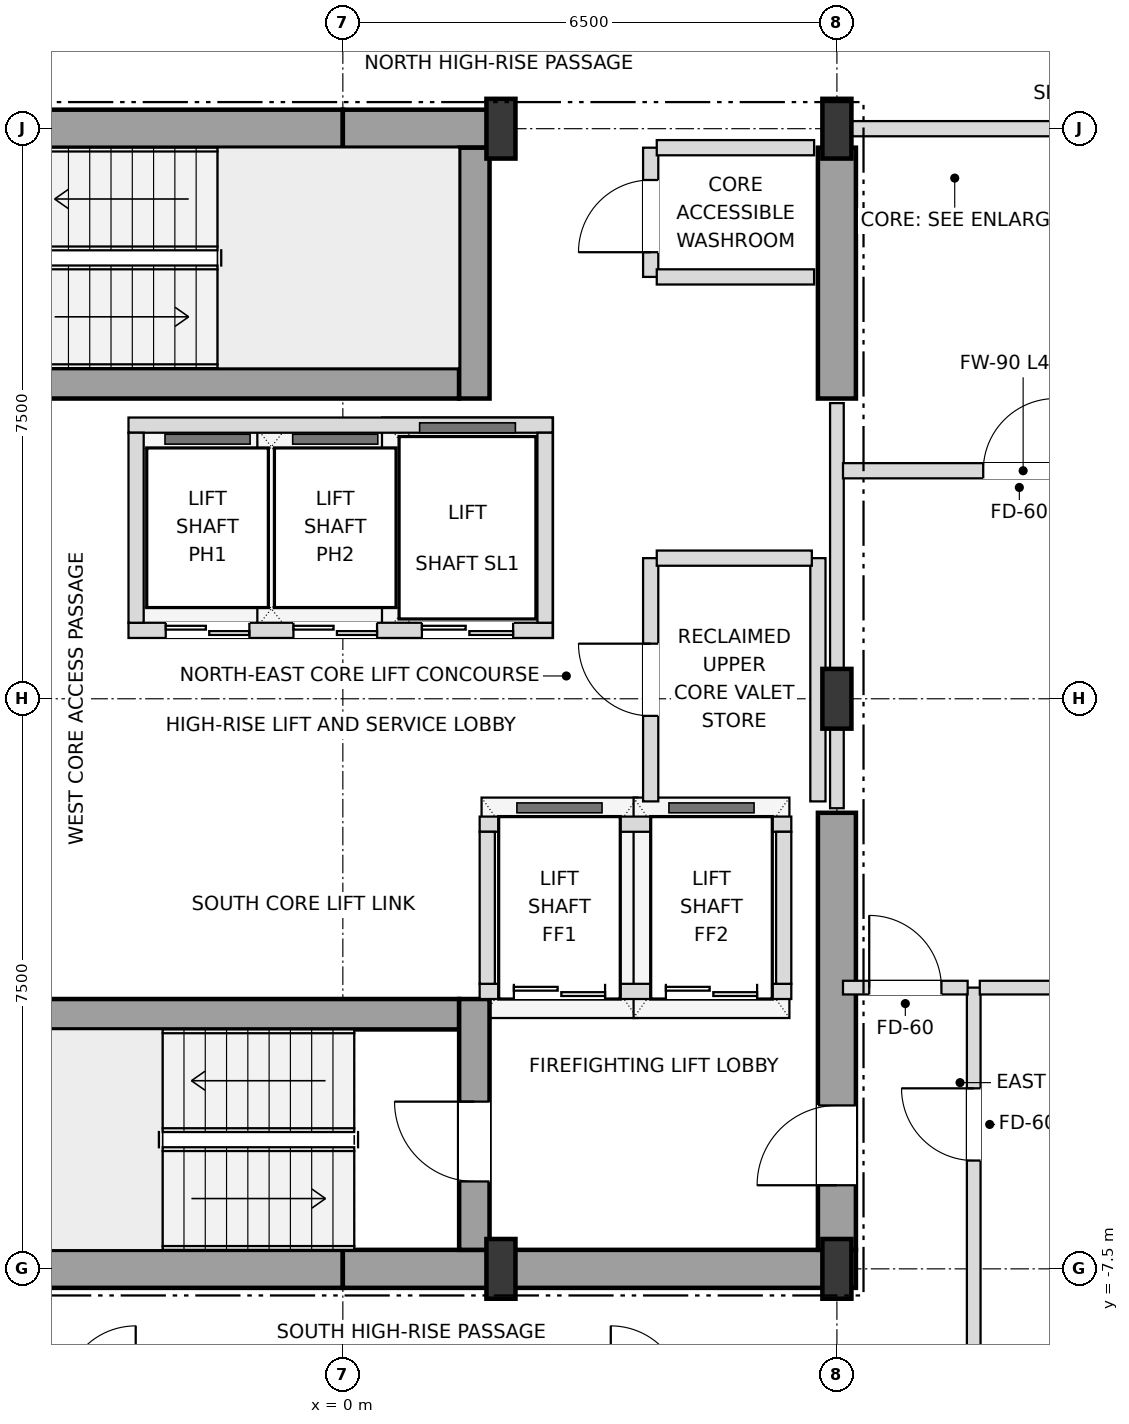
"""IFC4 building model, lengths in metres.
Left out: names, types, materials, properties, quantities, classifications, styles, units other than length and angle.
Written with IfcOpenShell. Run it as: python <this file> out.ifc"""

import sys

from ifc_helpers import new_model, si_unit, direction, frame, frame_2d, origin, origin_2d, place, context, subcontext, project, spatial, rectangle, i_section, extrude, element, fill, save


model = new_model("IFC4")
c1 = context("Model", 3, precision=1e-05, world=origin(), true_north=direction((0.0, 1.0)))
c2 = subcontext(c1, "Body", "Model", "MODEL_VIEW")
j1 = project(units=[si_unit("LENGTHUNIT", "METRE"), si_unit("PLANEANGLEUNIT", "RADIAN")], contexts=[c1])
p1 = place(None, origin())
s1 = spatial("IfcSite", under=j1, at=p1, CompositionType="ELEMENT")
p2 = place(p1, origin())
s2 = spatial("IfcBuilding", under=s1, at=p2, CompositionType="ELEMENT")
p3 = place(p2, frame((0.0, 0.0, 222.3)))
s3 = spatial("IfcBuildingStorey", under=s2, at=p3, CompositionType="ELEMENT", Elevation=222.3)
for number, where, z_axis, x_axis in (
    (1, (2.08, -7.5, 0.0), (0.0, 0.0, 1.0), (1.0, 0.0, 0.0)),
    (2, (6.5, -7.5, 0.0), (0.0, 0.0, 1.0), (1.0, 0.0, 0.0)),
    (3, (6.5, 0.0, 0.0), (0.0, 0.0, 1.0), (1.0, 0.0, 0.0)),
    (4, (2.08, 7.5, 0.0), (0.0, 0.0, 1.0), (1.0, 0.0, 0.0)),
    (5, (6.5, 7.5, 0.0), (0.0, 0.0, 1.0), (1.0, 0.0, 0.0)),
):
    element("IfcColumn", number, at=place(p3, frame(where, z_axis=z_axis, x_axis=x_axis)), inside=s3, PredefinedType="COLUMN", context=c2, shape_type="SweptSolid", body=[
        extrude(i_section(OverallWidth=0.382, OverallDepth=0.786, WebThickness=0.02, FlangeThickness=0.033, at=origin_2d()), origin(), (0.0, 0.0, 1.0), 3.6),
    ])
for number, where, z_axis, x_axis in (
    (6, (-6.75, -7.5, 0.0), (0.0, 0.0, 1.0), (1.0, 0.0, 0.0)),
    (7, (0.0, -7.5, 0.0), (0.0, 0.0, 1.0), (1.0, 0.0, 0.0)),
):
    element("IfcWall", number, at=place(p3, frame(where, z_axis=z_axis, x_axis=x_axis)), inside=s3, PredefinedType="SHEAR", context=c2, shape_type="SweptSolid", body=[
        extrude(rectangle(XDim=6.75, YDim=0.5, at=frame_2d((3.375, 0.0))), origin(), (0.0, 0.0, 1.0), 3.38),
    ])
p4 = place(p3, frame((-6.75, 7.5, 0.0), z_axis=(0.0, 0.0, 1.0), x_axis=(1.0, 0.0, 0.0)))
e8 = element("IfcWall", 8, at=p4, inside=s3, PredefinedType="SHEAR", context=c2, shape_type="SweptSolid", body=[
    extrude(rectangle(XDim=6.75, YDim=0.5, at=frame_2d((3.375, 0.0))), origin(), (0.0, 0.0, 1.0), 3.38),
])
p5 = place(p4, frame((1.65, 0.0, 0.0)))
e9 = element("IfcOpeningElement", 9, at=p5, cuts=e8, PredefinedType="OPENING", context=c2, shape_type="SweptSolid", body=[
    extrude(rectangle(XDim=1.05, YDim=2.15, at=frame_2d((0.525, 1.075))), frame((0.0, 0.26, 0.0), z_axis=(0.0, -1.0, 0.0), x_axis=(1.0, 0.0, 0.0)), (0.0, 0.0, 1.0), 0.52),
])
p6 = place(p3, frame((0.0, 7.5, 0.0), z_axis=(0.0, 0.0, 1.0), x_axis=(1.0, 0.0, 0.0)))
e10 = element("IfcWall", 10, at=p6, inside=s3, PredefinedType="SHEAR", context=c2, shape_type="SweptSolid", body=[
    extrude(rectangle(XDim=2.08, YDim=0.5, at=frame_2d((1.04, 0.0))), origin(), (0.0, 0.0, 1.0), 3.38),
])
p7 = place(p3, frame((6.5, -7.25, 0.0), z_axis=(0.0, 0.0, 1.0), x_axis=(0.0, 1.0, 0.0)))
e11 = element("IfcWall", 11, at=p7, inside=s3, PredefinedType="SHEAR", context=c2, shape_type="SweptSolid", body=[
    extrude(rectangle(XDim=5.75, YDim=0.5, at=frame_2d((2.875, 0.0))), origin(), (0.0, 0.0, 1.0), 3.38),
])
p8 = place(p7, frame((0.85, 0.0, 0.0)))
e12 = element("IfcOpeningElement", 12, at=p8, cuts=e11, PredefinedType="OPENING", context=c2, shape_type="SweptSolid", body=[
    extrude(rectangle(XDim=1.05, YDim=2.15, at=frame_2d((0.525, 1.075))), frame((0.0, 0.26, 0.0), z_axis=(0.0, -1.0, 0.0), x_axis=(1.0, 0.0, 0.0)), (0.0, 0.0, 1.0), 0.52),
])
p9 = place(p3, frame((6.5, 3.95, 0.0), z_axis=(0.0, 0.0, 1.0), x_axis=(0.0, 1.0, 0.0)))
e13 = element("IfcWall", 13, at=p9, inside=s3, PredefinedType="SHEAR", context=c2, shape_type="SweptSolid", body=[
    extrude(rectangle(XDim=3.3, YDim=0.5, at=frame_2d((1.65, 0.0))), origin(), (0.0, 0.0, 1.0), 3.38),
])
p10 = place(p3, frame((-6.25, -4.15, 0.0), z_axis=(0.0, 0.0, 1.0), x_axis=(1.0, 0.0, 0.0)))
e14 = element("IfcWall", 14, at=p10, inside=s3, PredefinedType="SHEAR", context=c2, shape_type="SweptSolid", body=[
    extrude(rectangle(XDim=7.78, YDim=0.4, at=frame_2d((3.89, 0.0))), origin(), (0.0, 0.0, 1.0), 3.38),
])
p11 = place(p3, frame((1.73, -7.25, 0.0), z_axis=(0.0, 0.0, 1.0), x_axis=(0.0, 1.0, 0.0)))
e15 = element("IfcWall", 15, at=p11, inside=s3, PredefinedType="SHEAR", context=c2, shape_type="SweptSolid", body=[
    extrude(rectangle(XDim=3.3, YDim=0.4, at=frame_2d((1.65, 0.0))), origin(), (0.0, 0.0, 1.0), 3.38),
])
p12 = place(p11, frame((0.9, 0.0, 0.0)))
e16 = element("IfcOpeningElement", 16, at=p12, cuts=e15, PredefinedType="OPENING", context=c2, shape_type="SweptSolid", body=[
    extrude(rectangle(XDim=1.05, YDim=2.15, at=frame_2d((0.525, 1.075))), frame((0.0, 0.21, 0.0), z_axis=(0.0, -1.0, 0.0), x_axis=(1.0, 0.0, 0.0)), (0.0, 0.0, 1.0), 0.42),
])
p13 = place(p3, frame((-5.55, 4.15, 0.0), z_axis=(0.0, 0.0, 1.0), x_axis=(1.0, 0.0, 0.0)))
e17 = element("IfcWall", 17, at=p13, inside=s3, PredefinedType="SHEAR", context=c2, shape_type="SweptSolid", body=[
    extrude(rectangle(XDim=7.08, YDim=0.4, at=frame_2d((3.54, 0.0))), origin(), (0.0, 0.0, 1.0), 3.38),
])
p14 = place(p3, frame((1.73, 3.95, 0.0), z_axis=(0.0, 0.0, 1.0), x_axis=(0.0, 1.0, 0.0)))
e18 = element("IfcWall", 18, at=p14, inside=s3, PredefinedType="SHEAR", context=c2, shape_type="SweptSolid", body=[
    extrude(rectangle(XDim=3.3, YDim=0.4, at=frame_2d((1.65, 0.0))), origin(), (0.0, 0.0, 1.0), 3.38),
])
p15 = place(p3, frame((-2.82, 0.9, 0.0), z_axis=(0.0, 0.0, 1.0), x_axis=(1.0, 0.0, 0.0)))
e19 = element("IfcWall", 19, at=p15, inside=s3, PredefinedType="SOLIDWALL", context=c2, shape_type="SweptSolid", body=[
    extrude(rectangle(XDim=5.58, YDim=0.2, at=frame_2d((2.79, 0.0))), origin(), (0.0, 0.0, 1.0), 3.38),
])
p16 = place(p15, frame((0.49, 0.0, 0.0)))
e20 = element("IfcOpeningElement", 20, at=p16, cuts=e19, PredefinedType="OPENING", context=c2, shape_type="SweptSolid", body=[
    extrude(rectangle(XDim=1.1, YDim=2.15, at=frame_2d((0.55, 1.075))), frame((0.0, 0.11, 0.0), z_axis=(0.0, -1.0, 0.0), x_axis=(1.0, 0.0, 0.0)), (0.0, 0.0, 1.0), 0.22),
])
p17 = place(p15, frame((2.17, 0.0, 0.0)))
e21 = element("IfcOpeningElement", 21, at=p17, cuts=e19, PredefinedType="OPENING", context=c2, shape_type="SweptSolid", body=[
    extrude(rectangle(XDim=1.1, YDim=2.15, at=frame_2d((0.55, 1.075))), frame((0.0, 0.11, 0.0), z_axis=(0.0, -1.0, 0.0), x_axis=(1.0, 0.0, 0.0)), (0.0, 0.0, 1.0), 0.22),
])
p18 = place(p15, frame((3.86, 0.0, 0.0)))
e22 = element("IfcOpeningElement", 22, at=p18, cuts=e19, PredefinedType="OPENING", context=c2, shape_type="SweptSolid", body=[
    extrude(rectangle(XDim=1.2, YDim=2.2, at=frame_2d((0.6, 1.1))), frame((0.0, 0.11, 0.0), z_axis=(0.0, -1.0, 0.0), x_axis=(1.0, 0.0, 0.0)), (0.0, 0.0, 1.0), 0.22),
])
p19 = place(p3, frame((-2.82, 3.6, 0.0), z_axis=(0.0, 0.0, 1.0), x_axis=(1.0, 0.0, 0.0)))
e23 = element("IfcWall", 23, at=p19, inside=s3, PredefinedType="SOLIDWALL", context=c2, shape_type="SweptSolid", body=[
    extrude(rectangle(XDim=5.58, YDim=0.2, at=frame_2d((2.79, 0.0))), origin(), (0.0, 0.0, 1.0), 3.38),
])
for number, where, z_axis, x_axis in (
    (24, (-2.72, 1.0, 0.0), (0.0, 0.0, 1.0), (0.0, 1.0, 0.0)),
    (25, (2.66, 1.0, 0.0), (0.0, 0.0, 1.0), (0.0, 1.0, 0.0)),
):
    element("IfcWall", number, at=place(p3, frame(where, z_axis=z_axis, x_axis=x_axis)), inside=s3, PredefinedType="SOLIDWALL", context=c2, shape_type="SweptSolid", body=[
        extrude(rectangle(XDim=2.5, YDim=0.2, at=frame_2d((1.25, 0.0))), origin(), (0.0, 0.0, 1.0), 3.38),
    ])
p20 = place(p3, frame((1.8, -3.85, 0.0), z_axis=(0.0, 0.0, 1.0), x_axis=(1.0, 0.0, 0.0)))
e26 = element("IfcWall", 26, at=p20, inside=s3, PredefinedType="SOLIDWALL", context=c2, shape_type="SweptSolid", body=[
    extrude(rectangle(XDim=4.1, YDim=0.2, at=frame_2d((2.05, 0.0))), origin(), (0.0, 0.0, 1.0), 3.38),
])
p21 = place(p20, frame((0.45, 0.0, 0.0)))
e27 = element("IfcOpeningElement", 27, at=p21, cuts=e26, PredefinedType="OPENING", context=c2, shape_type="SweptSolid", body=[
    extrude(rectangle(XDim=1.2, YDim=2.2, at=frame_2d((0.6, 1.1))), frame((0.0, 0.11, 0.0), z_axis=(0.0, -1.0, 0.0), x_axis=(1.0, 0.0, 0.0)), (0.0, 0.0, 1.0), 0.22),
])
p22 = place(p20, frame((2.45, 0.0, 0.0)))
e28 = element("IfcOpeningElement", 28, at=p22, cuts=e26, PredefinedType="OPENING", context=c2, shape_type="SweptSolid", body=[
    extrude(rectangle(XDim=1.2, YDim=2.2, at=frame_2d((0.6, 1.1))), frame((0.0, 0.11, 0.0), z_axis=(0.0, -1.0, 0.0), x_axis=(1.0, 0.0, 0.0)), (0.0, 0.0, 1.0), 0.22),
])
p23 = place(p3, frame((1.8, -1.65, 0.0), z_axis=(0.0, 0.0, 1.0), x_axis=(1.0, 0.0, 0.0)))
e29 = element("IfcWall", 29, at=p23, inside=s3, PredefinedType="SOLIDWALL", context=c2, shape_type="SweptSolid", body=[
    extrude(rectangle(XDim=4.1, YDim=0.2, at=frame_2d((2.05, 0.0))), origin(), (0.0, 0.0, 1.0), 3.38),
])
for number, where, z_axis, x_axis in (
    (30, (1.9, -3.75, 0.0), (0.0, 0.0, 1.0), (0.0, 1.0, 0.0)),
    (31, (5.8, -3.75, 0.0), (0.0, 0.0, 1.0), (0.0, 1.0, 0.0)),
):
    element("IfcWall", number, at=place(p3, frame(where, z_axis=z_axis, x_axis=x_axis)), inside=s3, PredefinedType="SOLIDWALL", context=c2, shape_type="SweptSolid", body=[
        extrude(rectangle(XDim=2.0, YDim=0.2, at=frame_2d((1.0, 0.0))), origin(), (0.0, 0.0, 1.0), 3.38),
    ])
p24 = place(p3, frame((4.05, -1.35, 0.0), z_axis=(0.0, 0.0, 1.0), x_axis=(0.0, 1.0, 0.0)))
e32 = element("IfcWall", 32, at=p24, inside=s3, PredefinedType="SOLIDWALL", context=c2, shape_type="SweptSolid", body=[
    extrude(rectangle(XDim=3.2, YDim=0.2, at=frame_2d((1.6, 0.0))), origin(), (0.0, 0.0, 1.0), 3.38),
])
p25 = place(p24, frame((1.125, 0.0, 0.0)))
e33 = element("IfcOpeningElement", 33, at=p25, cuts=e32, PredefinedType="OPENING", context=c2, shape_type="SweptSolid", body=[
    extrude(rectangle(XDim=0.95, YDim=2.15, at=frame_2d((0.475, 1.075))), frame((0.0, 0.11, 0.0), z_axis=(0.0, -1.0, 0.0), x_axis=(1.0, 0.0, 0.0)), (0.0, 0.0, 1.0), 0.22),
])
p26 = place(p3, frame((4.05, 5.55, 0.0), z_axis=(0.0, 0.0, 1.0), x_axis=(0.0, 1.0, 0.0)))
e34 = element("IfcWall", 34, at=p26, inside=s3, PredefinedType="SOLIDWALL", context=c2, shape_type="SweptSolid", body=[
    extrude(rectangle(XDim=1.7, YDim=0.2, at=frame_2d((0.85, 0.0))), origin(), (0.0, 0.0, 1.0), 3.38),
])
p27 = place(p26, frame((0.325, 0.0, 0.0)))
e35 = element("IfcOpeningElement", 35, at=p27, cuts=e34, PredefinedType="OPENING", context=c2, shape_type="SweptSolid", body=[
    extrude(rectangle(XDim=0.95, YDim=2.15, at=frame_2d((0.475, 1.075))), frame((0.0, 0.11, 0.0), z_axis=(0.0, -1.0, 0.0), x_axis=(1.0, 0.0, 0.0)), (0.0, 0.0, 1.0), 0.22),
])
p28 = place(p3, frame((6.25, -1.35, 0.0), z_axis=(0.0, 0.0, 1.0), x_axis=(0.0, 1.0, 0.0)))
e36 = element("IfcWall", 36, at=p28, inside=s3, PredefinedType="SOLIDWALL", context=c2, shape_type="SweptSolid", body=[
    extrude(rectangle(XDim=3.2, YDim=0.2, at=frame_2d((1.6, 0.0))), origin(), (0.0, 0.0, 1.0), 3.38),
])
p29 = place(p3, frame((6.5, -1.44, 0.0), z_axis=(0.0, 0.0, 1.0), x_axis=(0.0, 1.0, 0.0)))
e37 = element("IfcWall", 37, at=p29, inside=s3, PredefinedType="PARTITIONING", context=c2, shape_type="SweptSolid", body=[
    extrude(rectangle(XDim=5.33, YDim=0.18, at=frame_2d((2.665, 0.0))), origin(), (0.0, 0.0, 1.0), 2.826),
])
p30 = place(p3, frame((8.3, -9.2, 0.0), z_axis=(0.0, 0.0, 1.0), x_axis=(0.0, 1.0, 0.0)))
e38 = element("IfcWall", 38, at=p30, inside=s3, PredefinedType="PARTITIONING", context=c2, shape_type="SweptSolid", body=[
    extrude(rectangle(XDim=5.4, YDim=0.18, at=frame_2d((2.7, 0.0))), origin(), (0.0, 0.0, 1.0), 2.826),
])
p31 = place(p30, frame((3.125, 0.0, 0.0)))
e39 = element("IfcOpeningElement", 39, at=p31, cuts=e38, PredefinedType="OPENING", context=c2, shape_type="SweptSolid", body=[
    extrude(rectangle(XDim=0.95, YDim=2.15, at=frame_2d((0.475, 1.075))), frame((0.0, 0.1, 0.0), z_axis=(0.0, -1.0, 0.0), x_axis=(1.0, 0.0, 0.0)), (0.0, 0.0, 1.0), 0.2),
])
p32 = place(p3, frame((6.58, -3.8, 0.0), z_axis=(0.0, 0.0, 1.0), x_axis=(1.0, 0.0, 0.0)))
e40 = element("IfcWall", 40, at=p32, inside=s3, PredefinedType="PARTITIONING", context=c2, shape_type="SweptSolid", body=[
    extrude(rectangle(XDim=1.64, YDim=0.18, at=frame_2d((0.82, 0.0))), origin(), (0.0, 0.0, 1.0), 3.38),
])
p33 = place(p32, frame((0.345, 0.0, 0.0)))
e41 = element("IfcOpeningElement", 41, at=p33, cuts=e40, PredefinedType="OPENING", context=c2, shape_type="SweptSolid", body=[
    extrude(rectangle(XDim=0.95, YDim=2.15, at=frame_2d((0.475, 1.075))), frame((0.0, 0.1, 0.0), z_axis=(0.0, -1.0, 0.0), x_axis=(1.0, 0.0, 0.0)), (0.0, 0.0, 1.0), 0.2),
])
p34 = place(p3, frame((8.38, -3.8, 0.0), z_axis=(0.0, 0.0, 1.0), x_axis=(1.0, 0.0, 0.0)))
e42 = element("IfcWall", 42, at=p34, inside=s3, PredefinedType="PARTITIONING", context=c2, shape_type="SweptSolid", body=[
    extrude(rectangle(XDim=8.44, YDim=0.18, at=frame_2d((4.22, 0.0))), origin(), (0.0, 0.0, 1.0), 3.018),
])
p35 = place(p3, frame((4.13, 1.85, 0.0), z_axis=(0.0, 0.0, 1.0), x_axis=(1.0, 0.0, 0.0)))
e43 = element("IfcWall", 43, at=p35, inside=s3, PredefinedType="SOLIDWALL", context=c2, shape_type="SweptSolid", body=[
    extrude(rectangle(XDim=2.04, YDim=0.2, at=frame_2d((1.02, 0.0))), origin(), (0.0, 0.0, 1.0), 3.38),
])
p36 = place(p3, frame((6.58, 3.0, 0.0), z_axis=(0.0, 0.0, 1.0), x_axis=(1.0, 0.0, 0.0)))
e44 = element("IfcWall", 44, at=p36, inside=s3, PredefinedType="SOLIDWALL", context=c2, shape_type="SweptSolid", body=[
    extrude(rectangle(XDim=4.74, YDim=0.2, at=frame_2d((2.37, 0.0))), origin(), (0.0, 0.0, 1.0), 3.38),
])
p37 = place(p36, frame((1.845, 0.0, 0.0)))
e45 = element("IfcOpeningElement", 45, at=p37, cuts=e44, PredefinedType="OPENING", context=c2, shape_type="SweptSolid", body=[
    extrude(rectangle(XDim=0.95, YDim=2.15, at=frame_2d((0.475, 1.075))), frame((0.0, 0.11, 0.0), z_axis=(0.0, -1.0, 0.0), x_axis=(1.0, 0.0, 0.0)), (0.0, 0.0, 1.0), 0.22),
])
for number, where, z_axis, x_axis in (
    (46, (4.13, 5.55, 0.0), (0.0, 0.0, 1.0), (1.0, 0.0, 0.0)),
    (47, (4.13, 7.25, 0.0), (0.0, 0.0, 1.0), (1.0, 0.0, 0.0)),
):
    element("IfcWall", number, at=place(p3, frame(where, z_axis=z_axis, x_axis=x_axis)), inside=s3, PredefinedType="SOLIDWALL", context=c2, shape_type="SweptSolid", body=[
        extrude(rectangle(XDim=2.07, YDim=0.2, at=frame_2d((1.035, 0.0))), origin(), (0.0, 0.0, 1.0), 3.38),
    ])
p38 = place(p3, frame((6.5, 7.5, 0.0), z_axis=(0.0, 0.0, 1.0), x_axis=(1.0, 0.0, 0.0)))
e48 = element("IfcWall", 48, at=p38, inside=s3, PredefinedType="SOLIDWALL", context=c2, shape_type="SweptSolid", body=[
    extrude(rectangle(XDim=4.82, YDim=0.2, at=frame_2d((2.41, 0.0))), origin(), (0.0, 0.0, 1.0), 2.826),
])
p39 = place(p8, origin())
e49 = element("IfcDoor", 49, at=p39, inside=s3, OperationType="SINGLE_SWING_LEFT", PredefinedType="DOOR", context=c2, shape_type="SweptSolid", body=[
    extrude(rectangle(XDim=1.05, YDim=2.15, at=frame_2d((0.525, 1.075))), frame((0.0, 0.025, 0.0), z_axis=(0.0, -1.0, 0.0), x_axis=(1.0, 0.0, 0.0)), (0.0, 0.0, 1.0), 0.05),
])
fill(e12, e49)
p40 = place(p12, origin())
e50 = element("IfcDoor", 50, at=p40, inside=s3, OperationType="SINGLE_SWING_RIGHT", PredefinedType="DOOR", context=c2, shape_type="SweptSolid", body=[
    extrude(rectangle(XDim=1.05, YDim=2.15, at=frame_2d((0.525, 1.075))), frame((0.0, 0.025, 0.0), z_axis=(0.0, -1.0, 0.0), x_axis=(1.0, 0.0, 0.0)), (0.0, 0.0, 1.0), 0.05),
])
fill(e16, e50)
p41 = place(p16, origin())
e51 = element("IfcDoor", 51, at=p41, inside=s3, OperationType="DOUBLE_DOOR_SLIDING", PredefinedType="DOOR", context=c2, shape_type="SweptSolid", body=[
    extrude(rectangle(XDim=1.1, YDim=2.15, at=frame_2d((0.55, 1.075))), frame((0.0, 0.025, 0.0), z_axis=(0.0, -1.0, 0.0), x_axis=(1.0, 0.0, 0.0)), (0.0, 0.0, 1.0), 0.05),
])
fill(e20, e51)
p42 = place(p17, origin())
e52 = element("IfcDoor", 52, at=p42, inside=s3, OperationType="DOUBLE_DOOR_SLIDING", PredefinedType="DOOR", context=c2, shape_type="SweptSolid", body=[
    extrude(rectangle(XDim=1.1, YDim=2.15, at=frame_2d((0.55, 1.075))), frame((0.0, 0.025, 0.0), z_axis=(0.0, -1.0, 0.0), x_axis=(1.0, 0.0, 0.0)), (0.0, 0.0, 1.0), 0.05),
])
fill(e21, e52)
p43 = place(p18, origin())
e53 = element("IfcDoor", 53, at=p43, inside=s3, OperationType="DOUBLE_DOOR_SLIDING", PredefinedType="DOOR", context=c2, shape_type="SweptSolid", body=[
    extrude(rectangle(XDim=1.2, YDim=2.2, at=frame_2d((0.6, 1.1))), frame((0.0, 0.025, 0.0), z_axis=(0.0, -1.0, 0.0), x_axis=(1.0, 0.0, 0.0)), (0.0, 0.0, 1.0), 0.05),
])
fill(e22, e53)
p44 = place(p21, origin())
e54 = element("IfcDoor", 54, at=p44, inside=s3, OperationType="DOUBLE_DOOR_SLIDING", PredefinedType="DOOR", context=c2, shape_type="SweptSolid", body=[
    extrude(rectangle(XDim=1.2, YDim=2.2, at=frame_2d((0.6, 1.1))), frame((0.0, 0.025, 0.0), z_axis=(0.0, -1.0, 0.0), x_axis=(1.0, 0.0, 0.0)), (0.0, 0.0, 1.0), 0.05),
])
fill(e27, e54)
p45 = place(p22, origin())
e55 = element("IfcDoor", 55, at=p45, inside=s3, OperationType="DOUBLE_DOOR_SLIDING", PredefinedType="DOOR", context=c2, shape_type="SweptSolid", body=[
    extrude(rectangle(XDim=1.2, YDim=2.2, at=frame_2d((0.6, 1.1))), frame((0.0, 0.025, 0.0), z_axis=(0.0, -1.0, 0.0), x_axis=(1.0, 0.0, 0.0)), (0.0, 0.0, 1.0), 0.05),
])
fill(e28, e55)
p46 = place(p25, origin())
e56 = element("IfcDoor", 56, at=p46, inside=s3, OperationType="SINGLE_SWING_RIGHT", PredefinedType="DOOR", context=c2, shape_type="SweptSolid", body=[
    extrude(rectangle(XDim=0.95, YDim=2.15, at=frame_2d((0.475, 1.075))), frame((0.0, 0.025, 0.0), z_axis=(0.0, -1.0, 0.0), x_axis=(1.0, 0.0, 0.0)), (0.0, 0.0, 1.0), 0.05),
])
fill(e33, e56)
p47 = place(p27, origin())
e57 = element("IfcDoor", 57, at=p47, inside=s3, OperationType="SINGLE_SWING_LEFT", PredefinedType="DOOR", context=c2, shape_type="SweptSolid", body=[
    extrude(rectangle(XDim=0.95, YDim=2.15, at=frame_2d((0.475, 1.075))), frame((0.0, 0.025, 0.0), z_axis=(0.0, -1.0, 0.0), x_axis=(1.0, 0.0, 0.0)), (0.0, 0.0, 1.0), 0.05),
])
fill(e35, e57)
p48 = place(p31, origin())
e58 = element("IfcDoor", 58, at=p48, inside=s3, OperationType="SINGLE_SWING_RIGHT", PredefinedType="DOOR", context=c2, shape_type="SweptSolid", body=[
    extrude(rectangle(XDim=0.95, YDim=2.15, at=frame_2d((0.475, 1.075))), frame((0.0, 0.025, 0.0), z_axis=(0.0, -1.0, 0.0), x_axis=(1.0, 0.0, 0.0)), (0.0, 0.0, 1.0), 0.05),
])
fill(e39, e58)
p49 = place(p33, origin())
e59 = element("IfcDoor", 59, at=p49, inside=s3, OperationType="SINGLE_SWING_LEFT", PredefinedType="DOOR", context=c2, shape_type="SweptSolid", body=[
    extrude(rectangle(XDim=0.95, YDim=2.15, at=frame_2d((0.475, 1.075))), frame((0.0, 0.025, 0.0), z_axis=(0.0, -1.0, 0.0), x_axis=(1.0, 0.0, 0.0)), (0.0, 0.0, 1.0), 0.05),
])
fill(e41, e59)
p50 = place(p37, origin())
e60 = element("IfcDoor", 60, at=p50, inside=s3, OperationType="SINGLE_SWING_RIGHT", PredefinedType="DOOR", context=c2, shape_type="SweptSolid", body=[
    extrude(rectangle(XDim=0.95, YDim=2.15, at=frame_2d((0.475, 1.075))), frame((0.0, 0.025, 0.0), z_axis=(0.0, -1.0, 0.0), x_axis=(1.0, 0.0, 0.0)), (0.0, 0.0, 1.0), 0.05),
])
fill(e45, e60)
save(model, sys.argv[1])
